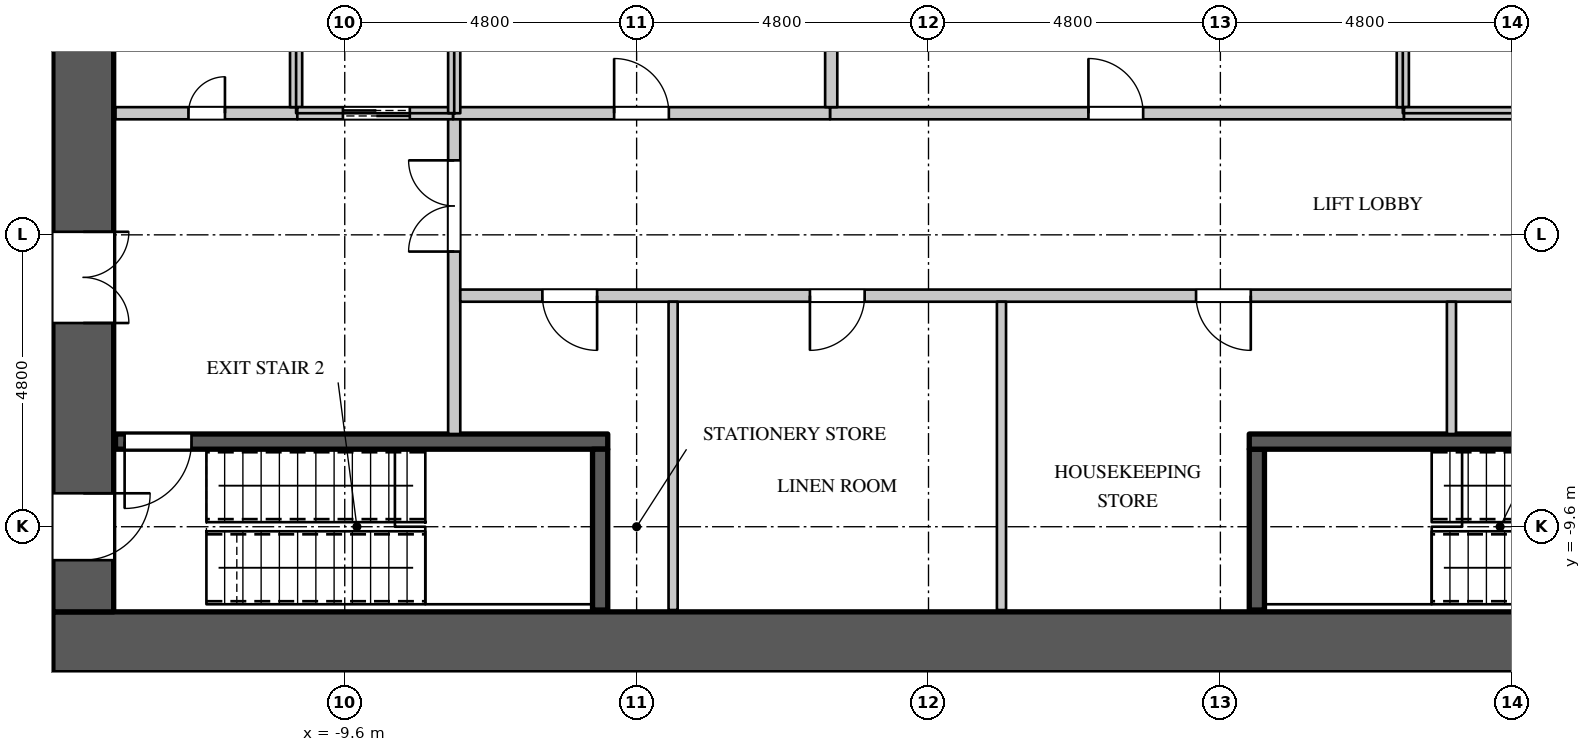
"""IFC4 building model, lengths in metres.
Left out: names, types, materials, properties, quantities, classifications, styles, units other than length and angle.
Written with IfcOpenShell. Run it as: python <this file> out.ifc"""

import sys

from ifc_helpers import new_model, si_unit, direction, frame, frame_2d, origin, place, context, subcontext, project, spatial, rectangle, extrude, element, fill, save


model = new_model("IFC4")
c1 = context("Model", 3, precision=1e-05, world=origin(), true_north=direction((0.0, 1.0)))
c2 = subcontext(c1, "Body", "Model", "MODEL_VIEW")
j1 = project(units=[si_unit("LENGTHUNIT", "METRE"), si_unit("PLANEANGLEUNIT", "RADIAN")], contexts=[c1])
p1 = place(None, origin())
s1 = spatial("IfcSite", under=j1, at=p1, CompositionType="ELEMENT")
p2 = place(p1, origin())
s2 = spatial("IfcBuilding", under=s1, at=p2, CompositionType="ELEMENT")
p3 = place(p2, frame((0.0, 0.0, 80.1)))
s3 = spatial("IfcBuildingStorey", under=s2, at=p3, CompositionType="ELEMENT", Elevation=80.1)
p4 = place(p3, frame((-14.4, -11.5, 0.0), z_axis=(0.0, 0.0, 1.0), x_axis=(1.0, 0.0, 0.0)))
e1 = element("IfcWall", 1, at=p4, inside=s3, PredefinedType="SHEAR", context=c2, shape_type="SweptSolid", body=[
    extrude(rectangle(XDim=28.8, YDim=1.0, at=frame_2d((14.4, 0.0))), origin(), (0.0, 0.0, 1.0), 4.2),
])
p5 = place(p3, frame((-13.9, -11.0, 0.0), z_axis=(0.0, 0.0, 1.0), x_axis=(0.0, 1.0, 0.0)))
e2 = element("IfcWall", 2, at=p5, inside=s3, PredefinedType="SHEAR", context=c2, shape_type="SweptSolid", body=[
    extrude(rectangle(XDim=22.0, YDim=1.0, at=frame_2d((11.0, 0.0))), origin(), (0.0, 0.0, 1.0), 4.2),
])
p6 = place(p5, frame((20.05, 0.0, 0.0)))
e3 = element("IfcOpeningElement", 3, at=p6, cuts=e2, PredefinedType="OPENING", context=c2, shape_type="SweptSolid", body=[
    extrude(rectangle(XDim=1.1, YDim=2.2, at=frame_2d((0.55, 1.1))), frame((0.0, 0.51, 0.0), z_axis=(0.0, -1.0, 0.0), x_axis=(1.0, 0.0, 0.0)), (0.0, 0.0, 1.0), 1.02),
])
p7 = place(p5, frame((0.85, 0.0, 0.0)))
e4 = element("IfcOpeningElement", 4, at=p7, cuts=e2, PredefinedType="OPENING", context=c2, shape_type="SweptSolid", body=[
    extrude(rectangle(XDim=1.1, YDim=2.2, at=frame_2d((0.55, 1.1))), frame((0.0, 0.51, 0.0), z_axis=(0.0, -1.0, 0.0), x_axis=(1.0, 0.0, 0.0)), (0.0, 0.0, 1.0), 1.02),
])
p8 = place(p5, frame((15.75, 0.0, 0.0)))
e5 = element("IfcOpeningElement", 5, at=p8, cuts=e2, PredefinedType="OPENING", context=c2, shape_type="SweptSolid", body=[
    extrude(rectangle(XDim=1.5, YDim=2.4, at=frame_2d((0.75, 1.2))), frame((0.0, 0.51, 0.0), z_axis=(0.0, -1.0, 0.0), x_axis=(1.0, 0.0, 0.0)), (0.0, 0.0, 1.0), 1.02),
])
p9 = place(p5, frame((4.75, 0.0, 0.0)))
e6 = element("IfcOpeningElement", 6, at=p9, cuts=e2, PredefinedType="OPENING", context=c2, shape_type="SweptSolid", body=[
    extrude(rectangle(XDim=1.5, YDim=2.4, at=frame_2d((0.75, 1.2))), frame((0.0, 0.51, 0.0), z_axis=(0.0, -1.0, 0.0), x_axis=(1.0, 0.0, 0.0)), (0.0, 0.0, 1.0), 1.02),
])
p10 = place(p3, frame((-7.8, -8.075, 0.0), z_axis=(0.0, 0.0, 1.0), x_axis=(0.0, 1.0, 0.0)))
e7 = element("IfcWall", 7, at=p10, inside=s3, PredefinedType="PARTITIONING", context=c2, shape_type="SweptSolid", body=[
    extrude(rectangle(XDim=5.275, YDim=0.2, at=frame_2d((2.637, 0.0))), origin(), (0.0, 0.0, 1.0), 3.95),
])
p11 = place(p10, frame((3.0, 0.0, 0.0)))
e8 = element("IfcOpeningElement", 8, at=p11, cuts=e7, PredefinedType="OPENING", context=c2, shape_type="SweptSolid", body=[
    extrude(rectangle(XDim=1.5, YDim=2.4, at=frame_2d((0.75, 1.2))), frame((0.0, 0.11, 0.0), z_axis=(0.0, -1.0, 0.0), x_axis=(1.0, 0.0, 0.0)), (0.0, 0.0, 1.0), 0.22),
])
p12 = place(p3, frame((-7.7, -5.8, 0.0), z_axis=(0.0, 0.0, 1.0), x_axis=(1.0, 0.0, 0.0)))
e9 = element("IfcWall", 9, at=p12, inside=s3, PredefinedType="PARTITIONING", context=c2, shape_type="SweptSolid", body=[
    extrude(rectangle(XDim=21.07, YDim=0.2, at=frame_2d((10.535, 0.0))), origin(), (0.0, 0.0, 1.0), 3.95),
])
p13 = place(p12, frame((1.35, 0.0, 0.0)))
e10 = element("IfcOpeningElement", 10, at=p13, cuts=e9, PredefinedType="OPENING", context=c2, shape_type="SweptSolid", body=[
    extrude(rectangle(XDim=0.9, YDim=2.2, at=frame_2d((0.45, 1.1))), frame((0.0, 0.11, 0.0), z_axis=(0.0, -1.0, 0.0), x_axis=(1.0, 0.0, 0.0)), (0.0, 0.0, 1.0), 0.22),
])
p14 = place(p12, frame((5.75, 0.0, 0.0)))
e11 = element("IfcOpeningElement", 11, at=p14, cuts=e9, PredefinedType="OPENING", context=c2, shape_type="SweptSolid", body=[
    extrude(rectangle(XDim=0.9, YDim=2.2, at=frame_2d((0.45, 1.1))), frame((0.0, 0.11, 0.0), z_axis=(0.0, -1.0, 0.0), x_axis=(1.0, 0.0, 0.0)), (0.0, 0.0, 1.0), 0.22),
])
p15 = place(p12, frame((12.1, 0.0, 0.0)))
e12 = element("IfcOpeningElement", 12, at=p15, cuts=e9, PredefinedType="OPENING", context=c2, shape_type="SweptSolid", body=[
    extrude(rectangle(XDim=0.9, YDim=2.2, at=frame_2d((0.45, 1.1))), frame((0.0, 0.11, 0.0), z_axis=(0.0, -1.0, 0.0), x_axis=(1.0, 0.0, 0.0)), (0.0, 0.0, 1.0), 0.22),
])
p16 = place(p12, frame((18.15, 0.0, 0.0)))
e13 = element("IfcOpeningElement", 13, at=p16, cuts=e9, PredefinedType="OPENING", context=c2, shape_type="SweptSolid", body=[
    extrude(rectangle(XDim=0.9, YDim=2.2, at=frame_2d((0.45, 1.1))), frame((0.0, 0.11, 0.0), z_axis=(0.0, -1.0, 0.0), x_axis=(1.0, 0.0, 0.0)), (0.0, 0.0, 1.0), 0.22),
])
p17 = place(p3, frame((-1.62, -2.8, 0.0), z_axis=(0.0, 0.0, 1.0), x_axis=(1.0, 0.0, 0.0)))
e14 = element("IfcWall", 14, at=p17, inside=s3, PredefinedType="PARTITIONING", context=c2, shape_type="SweptSolid", body=[
    extrude(rectangle(XDim=9.44, YDim=0.2, at=frame_2d((4.72, 0.0))), origin(), (0.0, 0.0, 1.0), 3.95),
])
p18 = place(p17, frame((4.25, 0.0, 0.0)))
e15 = element("IfcOpeningElement", 15, at=p18, cuts=e14, PredefinedType="OPENING", context=c2, shape_type="SweptSolid", body=[
    extrude(rectangle(XDim=0.9, YDim=2.2, at=frame_2d((0.45, 1.1))), frame((0.0, 0.11, 0.0), z_axis=(0.0, -1.0, 0.0), x_axis=(1.0, 0.0, 0.0)), (0.0, 0.0, 1.0), 0.22),
])
p19 = place(p3, frame((-22.547, -11.885, 0.0), z_axis=(0.0, 0.0, 1.0), x_axis=(0.707106781187, -0.707106781187, 0.0)))
e16 = element("IfcWall", 16, at=p19, inside=s3, PredefinedType="PARTITIONING", context=c2, shape_type="SweptSolid", body=[
    extrude(rectangle(XDim=15.078, YDim=0.15, at=frame_2d((7.539, 0.0))), origin(), (0.0, 0.0, 1.0), 3.95),
])
p20 = place(p19, frame((3.95, 0.0, 0.0)))
e17 = element("IfcOpeningElement", 17, at=p20, cuts=e16, PredefinedType="OPENING", context=c2, shape_type="SweptSolid", body=[
    extrude(rectangle(XDim=0.95, YDim=2.2, at=frame_2d((0.475, 1.1))), frame((0.0, 0.085, 0.0), z_axis=(0.0, -1.0, 0.0), x_axis=(1.0, 0.0, 0.0)), (0.0, 0.0, 1.0), 0.17),
])
p21 = place(p19, frame((9.55, 0.0, 0.0)))
e18 = element("IfcOpeningElement", 18, at=p21, cuts=e16, PredefinedType="OPENING", context=c2, shape_type="SweptSolid", body=[
    extrude(rectangle(XDim=0.95, YDim=2.2, at=frame_2d((0.475, 1.1))), frame((0.0, 0.085, 0.0), z_axis=(0.0, -1.0, 0.0), x_axis=(1.0, 0.0, 0.0)), (0.0, 0.0, 1.0), 0.17),
])
p22 = place(p19, frame((13.95, 0.0, 0.0)))
e19 = element("IfcOpeningElement", 19, at=p22, cuts=e16, PredefinedType="OPENING", context=c2, shape_type="SweptSolid", body=[
    extrude(rectangle(XDim=0.95, YDim=2.2, at=frame_2d((0.475, 1.1))), frame((0.0, 0.085, 0.0), z_axis=(0.0, -1.0, 0.0), x_axis=(1.0, 0.0, 0.0)), (0.0, 0.0, 1.0), 0.17),
])
for number, where, z_axis, x_axis in (
    (20, (-4.2, -10.97, 0.0), (0.0, 0.0, 1.0), (0.0, 1.0, 0.0)),
    (21, (1.2, -10.97, 0.0), (0.0, 0.0, 1.0), (0.0, 1.0, 0.0)),
):
    element("IfcWall", number, at=place(p3, frame(where, z_axis=z_axis, x_axis=x_axis)), inside=s3, PredefinedType="PARTITIONING", context=c2, shape_type="SweptSolid", body=[
        extrude(rectangle(XDim=5.07, YDim=0.15, at=frame_2d((2.535, 0.0))), origin(), (0.0, 0.0, 1.0), 3.95),
    ])
p23 = place(p3, frame((8.6, -8.075, 0.0), z_axis=(0.0, 0.0, 1.0), x_axis=(0.0, 1.0, 0.0)))
e22 = element("IfcWall", 22, at=p23, inside=s3, PredefinedType="PARTITIONING", context=c2, shape_type="SweptSolid", body=[
    extrude(rectangle(XDim=2.175, YDim=0.15, at=frame_2d((1.087, 0.0))), origin(), (0.0, 0.0, 1.0), 3.95),
])
p24 = place(p3, frame((-13.37, -2.8, 0.0), z_axis=(0.0, 0.0, 1.0), x_axis=(1.0, 0.0, 0.0)))
e23 = element("IfcWall", 23, at=p24, inside=s3, PredefinedType="PARTITIONING", context=c2, shape_type="SweptSolid", body=[
    extrude(rectangle(XDim=2.99, YDim=0.2, at=frame_2d((1.495, 0.0))), origin(), (0.0, 0.0, 1.0), 3.95),
])
p25 = place(p24, frame((1.2, 0.0, 0.0)))
e24 = element("IfcOpeningElement", 24, at=p25, cuts=e23, PredefinedType="OPENING", context=c2, shape_type="SweptSolid", body=[
    extrude(rectangle(XDim=0.6, YDim=2.0, at=frame_2d((0.3, 1.0))), frame((0.0, 0.11, 0.0), z_axis=(0.0, -1.0, 0.0), x_axis=(1.0, 0.0, 0.0)), (0.0, 0.0, 1.0), 0.22),
])
p26 = place(p3, frame((-7.82, -2.8, 0.0), z_axis=(0.0, 0.0, 1.0), x_axis=(1.0, 0.0, 0.0)))
e25 = element("IfcWall", 25, at=p26, inside=s3, PredefinedType="PARTITIONING", context=c2, shape_type="SweptSolid", body=[
    extrude(rectangle(XDim=6.2, YDim=0.2, at=frame_2d((3.1, 0.0))), origin(), (0.0, 0.0, 1.0), 3.95),
])
p27 = place(p26, frame((2.65, 0.0, 0.0)))
e26 = element("IfcOpeningElement", 26, at=p27, cuts=e25, PredefinedType="OPENING", context=c2, shape_type="SweptSolid", body=[
    extrude(rectangle(XDim=0.9, YDim=2.2, at=frame_2d((0.45, 1.1))), frame((0.0, 0.11, 0.0), z_axis=(0.0, -1.0, 0.0), x_axis=(1.0, 0.0, 0.0)), (0.0, 0.0, 1.0), 0.22),
])
p28 = place(p3, frame((-1.6, -2.7, 0.0), z_axis=(0.0, 0.0, 1.0), x_axis=(0.0, 1.0, 0.0)))
e27 = element("IfcWall", 27, at=p28, inside=s3, PredefinedType="PARTITIONING", context=c2, shape_type="SweptSolid", body=[
    extrude(rectangle(XDim=2.6, YDim=0.2, at=frame_2d((1.3, 0.0))), origin(), (0.0, 0.0, 1.0), 3.95),
])
p29 = place(p3, frame((-10.4, -2.7, 0.0), z_axis=(0.0, 0.0, 1.0), x_axis=(0.0, 1.0, 0.0)))
e28 = element("IfcWall", 28, at=p29, inside=s3, PredefinedType="PARTITIONING", context=c2, shape_type="SweptSolid", body=[
    extrude(rectangle(XDim=2.7, YDim=0.2, at=frame_2d((1.35, 0.0))), origin(), (0.0, 0.0, 1.0), 3.95),
])
p30 = place(p3, frame((-10.38, -2.8, 0.0), z_axis=(0.0, 0.0, 1.0), x_axis=(1.0, 0.0, 0.0)))
e29 = element("IfcWall", 29, at=p30, inside=s3, PredefinedType="PARTITIONING", context=c2, shape_type="SweptSolid", body=[
    extrude(rectangle(XDim=2.56, YDim=0.2, at=frame_2d((1.28, 0.0))), origin(), (0.0, 0.0, 1.0), 3.95),
])
p31 = place(p30, frame((0.75, 0.0, 0.0)))
e30 = element("IfcOpeningElement", 30, at=p31, cuts=e29, PredefinedType="OPENING", context=c2, shape_type="SweptSolid", body=[
    extrude(rectangle(XDim=1.1, YDim=2.2, at=frame_2d((0.55, 1.1))), frame((0.0, 0.11, 0.0), z_axis=(0.0, -1.0, 0.0), x_axis=(1.0, 0.0, 0.0)), (0.0, 0.0, 1.0), 0.22),
])
p32 = place(p3, frame((-7.8, -2.8, 0.0), z_axis=(0.0, 0.0, 1.0), x_axis=(0.0, 1.0, 0.0)))
e31 = element("IfcWall", 31, at=p32, inside=s3, PredefinedType="PARTITIONING", context=c2, shape_type="SweptSolid", body=[
    extrude(rectangle(XDim=2.8, YDim=0.2, at=frame_2d((1.4, 0.0))), origin(), (0.0, 0.0, 1.0), 3.95),
])
p33 = place(p3, frame((7.8, -2.7, 0.0), z_axis=(0.0, 0.0, 1.0), x_axis=(0.0, 1.0, 0.0)))
e32 = element("IfcWall", 32, at=p33, inside=s3, PredefinedType="PARTITIONING", context=c2, shape_type="SweptSolid", body=[
    extrude(rectangle(XDim=2.7, YDim=0.2, at=frame_2d((1.35, 0.0))), origin(), (0.0, 0.0, 1.0), 3.95),
])
p34 = place(p3, frame((7.82, -2.8, 0.0), z_axis=(0.0, 0.0, 1.0), x_axis=(1.0, 0.0, 0.0)))
e33 = element("IfcWall", 33, at=p34, inside=s3, PredefinedType="PARTITIONING", context=c2, shape_type="SweptSolid", body=[
    extrude(rectangle(XDim=2.56, YDim=0.2, at=frame_2d((1.28, 0.0))), origin(), (0.0, 0.0, 1.0), 3.95),
])
p35 = place(p3, frame((-13.37, -8.2, 0.0), z_axis=(0.0, 0.0, 1.0), x_axis=(1.0, 0.0, 0.0)))
e34 = element("IfcWall", 34, at=p35, inside=s3, PredefinedType="SHEAR", context=c2, shape_type="SweptSolid", body=[
    extrude(rectangle(XDim=8.095, YDim=0.25, at=frame_2d((4.048, 0.0))), origin(), (0.0, 0.0, 1.0), 3.95),
])
p36 = place(p35, frame((0.15, 0.0, 0.0)))
e35 = element("IfcOpeningElement", 35, at=p36, cuts=e34, PredefinedType="OPENING", context=c2, shape_type="SweptSolid", body=[
    extrude(rectangle(XDim=1.1, YDim=2.2, at=frame_2d((0.55, 1.1))), frame((0.0, 0.135, 0.0), z_axis=(0.0, -1.0, 0.0), x_axis=(1.0, 0.0, 0.0)), (0.0, 0.0, 1.0), 0.27),
])
for number, where, z_axis, x_axis in (
    (36, (-5.4, -10.97, 0.0), (0.0, 0.0, 1.0), (0.0, 1.0, 0.0)),
    (37, (5.4, -10.97, 0.0), (0.0, 0.0, 1.0), (0.0, 1.0, 0.0)),
):
    element("IfcWall", number, at=place(p3, frame(where, z_axis=z_axis, x_axis=x_axis)), inside=s3, PredefinedType="SHEAR", context=c2, shape_type="SweptSolid", body=[
        extrude(rectangle(XDim=2.645, YDim=0.25, at=frame_2d((1.323, 0.0))), origin(), (0.0, 0.0, 1.0), 3.95),
    ])
p37 = place(p3, frame((5.275, -8.2, 0.0), z_axis=(0.0, 0.0, 1.0), x_axis=(1.0, 0.0, 0.0)))
e38 = element("IfcWall", 38, at=p37, inside=s3, PredefinedType="SHEAR", context=c2, shape_type="SweptSolid", body=[
    extrude(rectangle(XDim=8.095, YDim=0.25, at=frame_2d((4.048, 0.0))), origin(), (0.0, 0.0, 1.0), 3.95),
])
p38 = place(p25, origin())
e39 = element("IfcDoor", 39, at=p38, inside=s3, OperationType="SINGLE_SWING_RIGHT", PredefinedType="DOOR", context=c2, shape_type="SweptSolid", body=[
    extrude(rectangle(XDim=0.6, YDim=2.0, at=frame_2d((0.3, 1.0))), frame((0.0, 0.025, 0.0), z_axis=(0.0, -1.0, 0.0), x_axis=(1.0, 0.0, 0.0)), (0.0, 0.0, 1.0), 0.05),
])
fill(e24, e39)
p39 = place(p13, origin())
e40 = element("IfcDoor", 40, at=p39, inside=s3, OperationType="SINGLE_SWING_LEFT", PredefinedType="DOOR", context=c2, shape_type="SweptSolid", body=[
    extrude(rectangle(XDim=0.9, YDim=2.2, at=frame_2d((0.45, 1.1))), frame((0.0, 0.025, 0.0), z_axis=(0.0, -1.0, 0.0), x_axis=(1.0, 0.0, 0.0)), (0.0, 0.0, 1.0), 0.05),
])
fill(e10, e40)
p40 = place(p14, origin())
e41 = element("IfcDoor", 41, at=p40, inside=s3, OperationType="SINGLE_SWING_RIGHT", PredefinedType="DOOR", context=c2, shape_type="SweptSolid", body=[
    extrude(rectangle(XDim=0.9, YDim=2.2, at=frame_2d((0.45, 1.1))), frame((0.0, 0.025, 0.0), z_axis=(0.0, -1.0, 0.0), x_axis=(1.0, 0.0, 0.0)), (0.0, 0.0, 1.0), 0.05),
])
fill(e11, e41)
p41 = place(p15, origin())
e42 = element("IfcDoor", 42, at=p41, inside=s3, OperationType="SINGLE_SWING_LEFT", PredefinedType="DOOR", context=c2, shape_type="SweptSolid", body=[
    extrude(rectangle(XDim=0.9, YDim=2.2, at=frame_2d((0.45, 1.1))), frame((0.0, 0.025, 0.0), z_axis=(0.0, -1.0, 0.0), x_axis=(1.0, 0.0, 0.0)), (0.0, 0.0, 1.0), 0.05),
])
fill(e12, e42)
p42 = place(p27, origin())
e43 = element("IfcDoor", 43, at=p42, inside=s3, OperationType="SINGLE_SWING_LEFT", PredefinedType="DOOR", context=c2, shape_type="SweptSolid", body=[
    extrude(rectangle(XDim=0.9, YDim=2.2, at=frame_2d((0.45, 1.1))), frame((0.0, 0.025, 0.0), z_axis=(0.0, -1.0, 0.0), x_axis=(1.0, 0.0, 0.0)), (0.0, 0.0, 1.0), 0.05),
])
fill(e26, e43)
p43 = place(p18, origin())
e44 = element("IfcDoor", 44, at=p43, inside=s3, OperationType="SINGLE_SWING_LEFT", PredefinedType="DOOR", context=c2, shape_type="SweptSolid", body=[
    extrude(rectangle(XDim=0.9, YDim=2.2, at=frame_2d((0.45, 1.1))), frame((0.0, 0.025, 0.0), z_axis=(0.0, -1.0, 0.0), x_axis=(1.0, 0.0, 0.0)), (0.0, 0.0, 1.0), 0.05),
])
fill(e15, e44)
p44 = place(p31, origin())
e45 = element("IfcDoor", 45, at=p44, inside=s3, OperationType="DOUBLE_DOOR_SLIDING", PredefinedType="DOOR", context=c2, shape_type="SweptSolid", body=[
    extrude(rectangle(XDim=1.1, YDim=2.2, at=frame_2d((0.55, 1.1))), frame((0.0, 0.025, 0.0), z_axis=(0.0, -1.0, 0.0), x_axis=(1.0, 0.0, 0.0)), (0.0, 0.0, 1.0), 0.05),
])
fill(e30, e45)
p45 = place(p36, origin())
e46 = element("IfcDoor", 46, at=p45, inside=s3, OperationType="SINGLE_SWING_RIGHT", PredefinedType="DOOR", context=c2, shape_type="SweptSolid", body=[
    extrude(rectangle(XDim=1.1, YDim=2.2, at=frame_2d((0.55, 1.1))), frame((0.0, 0.025, 0.0), z_axis=(0.0, -1.0, 0.0), x_axis=(1.0, 0.0, 0.0)), (0.0, 0.0, 1.0), 0.05),
])
fill(e35, e46)
p46 = place(p11, origin())
e47 = element("IfcDoor", 47, at=p46, inside=s3, OperationType="DOUBLE_DOOR_SINGLE_SWING", PredefinedType="DOOR", context=c2, shape_type="SweptSolid", body=[
    extrude(rectangle(XDim=1.5, YDim=2.4, at=frame_2d((0.75, 1.2))), frame((0.0, 0.025, 0.0), z_axis=(0.0, -1.0, 0.0), x_axis=(1.0, 0.0, 0.0)), (0.0, 0.0, 1.0), 0.05),
])
fill(e8, e47)
p47 = place(p7, origin())
e48 = element("IfcDoor", 48, at=p47, inside=s3, OperationType="SINGLE_SWING_LEFT", PredefinedType="DOOR", context=c2, shape_type="SweptSolid", body=[
    extrude(rectangle(XDim=1.1, YDim=2.2, at=frame_2d((0.55, 1.1))), frame((0.0, -0.445, 0.0), z_axis=(0.0, -1.0, 0.0), x_axis=(1.0, 0.0, 0.0)), (0.0, 0.0, 1.0), 0.05),
])
fill(e4, e48)
p48 = place(p9, origin())
e49 = element("IfcDoor", 49, at=p48, inside=s3, OperationType="DOUBLE_DOOR_SINGLE_SWING", PredefinedType="DOOR", context=c2, shape_type="SweptSolid", body=[
    extrude(rectangle(XDim=1.5, YDim=2.4, at=frame_2d((0.75, 1.2))), frame((0.0, -0.445, 0.0), z_axis=(0.0, -1.0, 0.0), x_axis=(1.0, 0.0, 0.0)), (0.0, 0.0, 1.0), 0.05),
])
fill(e6, e49)
save(model, sys.argv[1])
